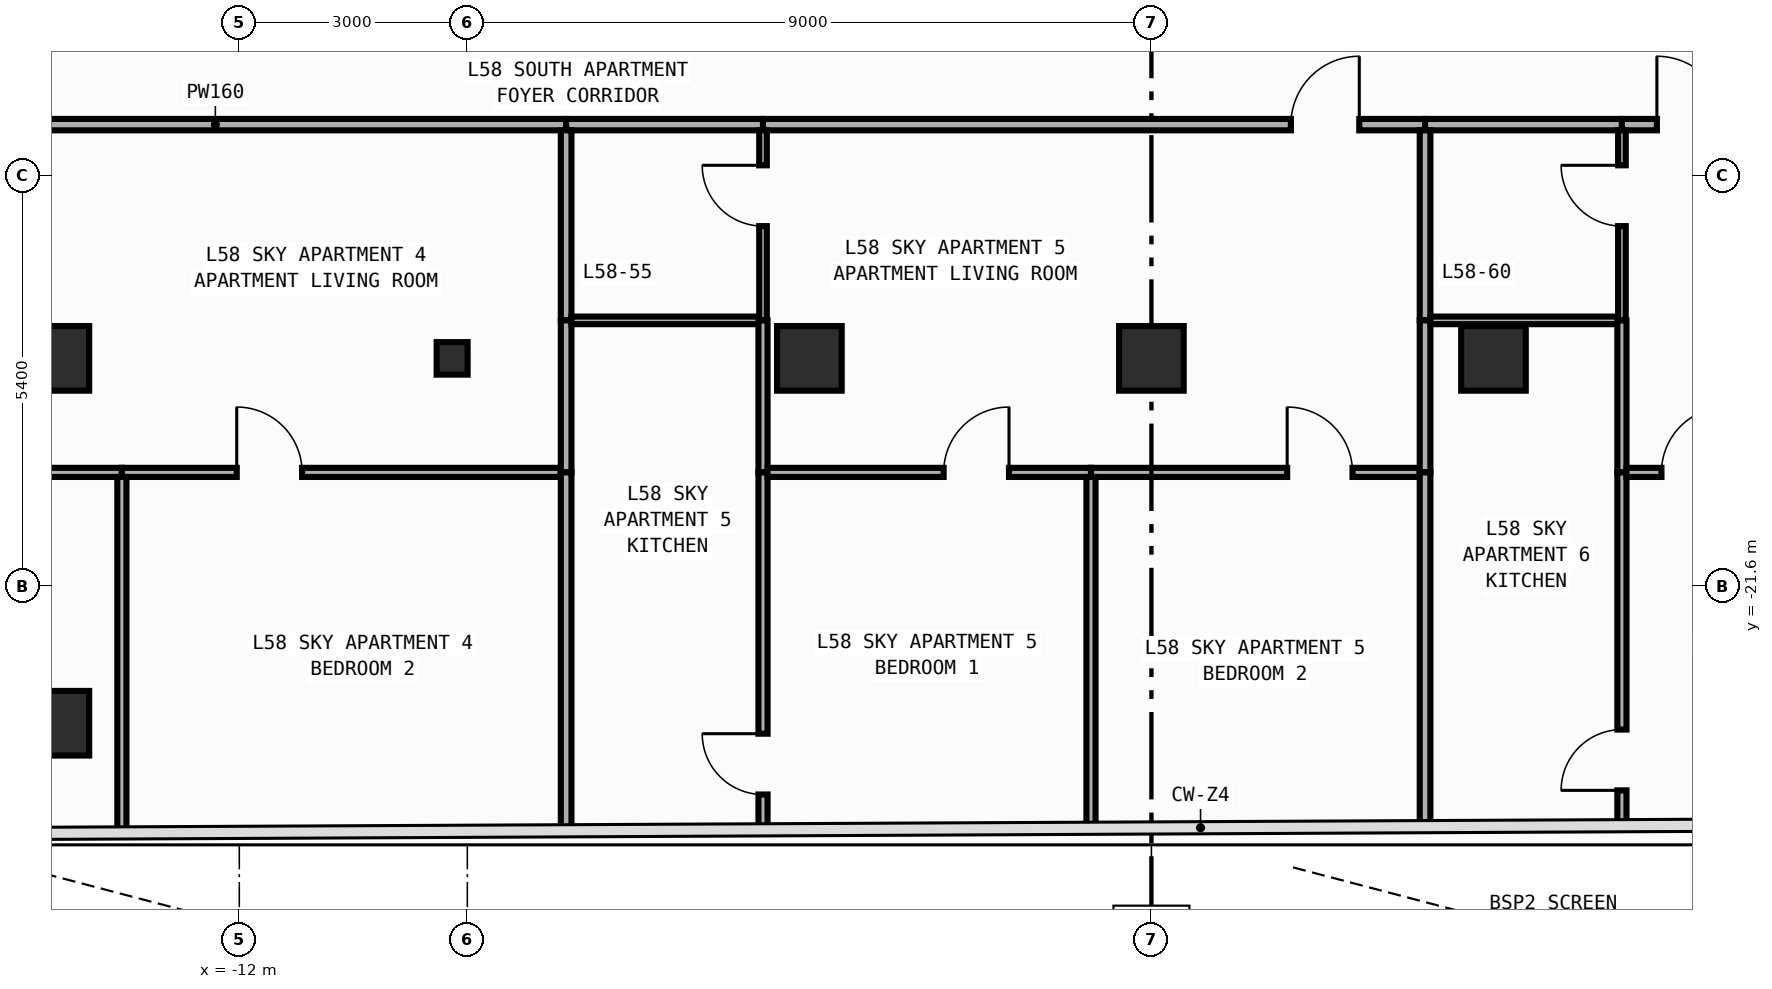
"""IFC4 building model, lengths in metres.
Left out: names, types, materials, properties, quantities, classifications, styles, units other than length and angle.
Written with IfcOpenShell. Run it as: python <this file> out.ifc"""

import sys

from ifc_helpers import new_model, si_unit, direction, frame, frame_2d, origin, origin_2d, place, context, subcontext, project, spatial, rectangle, i_section, extrude, element, fill, save


model = new_model("IFC4")
c1 = context("Model", 3, precision=1e-05, world=origin(), true_north=direction((0.0, 1.0)))
c2 = subcontext(c1, "Body", "Model", "MODEL_VIEW")
j1 = project(units=[si_unit("LENGTHUNIT", "METRE"), si_unit("PLANEANGLEUNIT", "RADIAN")], contexts=[c1])
p1 = place(None, origin())
s1 = spatial("IfcSite", under=j1, at=p1, CompositionType="ELEMENT")
p2 = place(p1, origin())
s2 = spatial("IfcBuilding", under=s1, at=p2, CompositionType="ELEMENT")
p3 = place(p2, frame((0.0, 0.0, 247.6)))
s3 = spatial("IfcBuildingStorey", under=s2, at=p3, CompositionType="ELEMENT", Elevation=247.6)
p4 = place(p3, frame((-9.2, -18.6, 0.0), z_axis=(0.0, 0.0, 1.0), x_axis=(1.0, 0.0, 0.0)))
e1 = element("IfcColumn", 1, at=p4, inside=s3, PredefinedType="COLUMN", context=c2, shape_type="SweptSolid", body=[
    extrude(i_section(OverallWidth=0.407, OverallDepth=0.428, WebThickness=0.02, FlangeThickness=0.035, FilletRadius=0.022, at=origin_2d()), origin(), (0.0, 0.0, 1.0), 3.6),
])
for number, where, z_axis, x_axis in (
    (2, (-14.4, -18.6, 0.0), (0.0, 0.0, 1.0), (1.0, 0.0, 0.0)),
    (3, (-4.5, -18.6, 0.0), (0.0, 0.0, 1.0), (1.0, 0.0, 0.0)),
    (4, (0.0, -18.6, 0.0), (0.0, 0.0, 1.0), (1.0, 0.0, 0.0)),
    (5, (4.5, -18.6, 0.0), (0.0, 0.0, 1.0), (1.0, 0.0, 0.0)),
    (6, (-14.4, -23.4, 0.0), (0.0, 0.0, 1.0), (1.0, 0.0, 0.0)),
):
    element("IfcColumn", number, at=place(p3, frame(where, z_axis=z_axis, x_axis=x_axis)), inside=s3, PredefinedType="COLUMN", context=c2, shape_type="SweptSolid", body=[
        extrude(rectangle(XDim=0.85, YDim=0.85, at=origin_2d()), origin(), (0.0, 0.0, 1.0), 3.6),
    ])
p5 = place(p3, frame((-19.31, -15.525, 0.0), z_axis=(0.0, 0.0, 1.0), x_axis=(1.0, 0.0, 0.0)))
e7 = element("IfcWall", 7, at=p5, inside=s3, PredefinedType="PARTITIONING", context=c2, shape_type="SweptSolid", body=[
    extrude(rectangle(XDim=11.61, YDim=0.15, at=frame_2d((5.805, 0.0))), origin(), (0.0, 0.0, 1.0), 3.34),
])
p6 = place(p5, frame((1.48, 0.0, 0.0)))
e8 = element("IfcOpeningElement", 8, at=p6, cuts=e7, PredefinedType="OPENING", context=c2, shape_type="SweptSolid", body=[
    extrude(rectangle(XDim=0.9, YDim=2.15, at=frame_2d((0.45, 1.075))), frame((0.0, 0.085, 0.0), z_axis=(0.0, -1.0, 0.0), x_axis=(1.0, 0.0, 0.0)), (0.0, 0.0, 1.0), 0.17),
])
p7 = place(p3, frame((-7.7, -15.525, 0.0), z_axis=(0.0, 0.0, 1.0), x_axis=(1.0, 0.0, 0.0)))
e9 = element("IfcWall", 9, at=p7, inside=s3, PredefinedType="PARTITIONING", context=c2, shape_type="SweptSolid", body=[
    extrude(rectangle(XDim=2.59, YDim=0.15, at=frame_2d((1.295, 0.0))), origin(), (0.0, 0.0, 1.0), 3.34),
])
p8 = place(p3, frame((-5.11, -15.525, 0.0), z_axis=(0.0, 0.0, 1.0), x_axis=(1.0, 0.0, 0.0)))
e10 = element("IfcWall", 10, at=p8, inside=s3, PredefinedType="PARTITIONING", context=c2, shape_type="SweptSolid", body=[
    extrude(rectangle(XDim=8.71, YDim=0.15, at=frame_2d((4.355, 0.0))), origin(), (0.0, 0.0, 1.0), 3.34),
])
p9 = place(p8, frame((6.945, 0.0, 0.0)))
e11 = element("IfcOpeningElement", 11, at=p9, cuts=e10, PredefinedType="OPENING", context=c2, shape_type="SweptSolid", body=[
    extrude(rectangle(XDim=0.9, YDim=2.15, at=frame_2d((0.45, 1.075))), frame((0.0, 0.085, 0.0), z_axis=(0.0, -1.0, 0.0), x_axis=(1.0, 0.0, 0.0)), (0.0, 0.0, 1.0), 0.17),
])
p10 = place(p3, frame((3.6, -15.525, 0.0), z_axis=(0.0, 0.0, 1.0), x_axis=(1.0, 0.0, 0.0)))
e12 = element("IfcWall", 12, at=p10, inside=s3, PredefinedType="PARTITIONING", context=c2, shape_type="SweptSolid", body=[
    extrude(rectangle(XDim=2.59, YDim=0.15, at=frame_2d((1.295, 0.0))), origin(), (0.0, 0.0, 1.0), 3.34),
])
p11 = place(p3, frame((6.19, -15.525, 0.0), z_axis=(0.0, 0.0, 1.0), x_axis=(1.0, 0.0, 0.0)))
e13 = element("IfcWall", 13, at=p11, inside=s3, PredefinedType="PARTITIONING", context=c2, shape_type="SweptSolid", body=[
    extrude(rectangle(XDim=6.05, YDim=0.15, at=frame_2d((3.025, 0.0))), origin(), (0.0, 0.0, 1.0), 3.34),
])
p12 = place(p11, frame((0.46, 0.0, 0.0)))
e14 = element("IfcOpeningElement", 14, at=p12, cuts=e13, PredefinedType="OPENING", context=c2, shape_type="SweptSolid", body=[
    extrude(rectangle(XDim=0.9, YDim=2.15, at=frame_2d((0.45, 1.075))), frame((0.0, 0.085, 0.0), z_axis=(0.0, -1.0, 0.0), x_axis=(1.0, 0.0, 0.0)), (0.0, 0.0, 1.0), 0.17),
])
p13 = place(p3, frame((-19.25, -20.1, 0.0), z_axis=(0.0, 0.0, 1.0), x_axis=(1.0, 0.0, 0.0)))
e15 = element("IfcWall", 15, at=p13, inside=s3, PredefinedType="PARTITIONING", context=c2, shape_type="SweptSolid", body=[
    extrude(rectangle(XDim=5.705, YDim=0.12, at=frame_2d((2.853, 0.0))), origin(), (0.0, 0.0, 1.0), 3.34),
])
p14 = place(p13, frame((1.493, 0.0, 0.0)))
e16 = element("IfcOpeningElement", 16, at=p14, cuts=e15, PredefinedType="OPENING", context=c2, shape_type="SweptSolid", body=[
    extrude(rectangle(XDim=0.86, YDim=2.15, at=frame_2d((0.43, 1.075))), frame((0.0, 0.07, 0.0), z_axis=(0.0, -1.0, 0.0), x_axis=(1.0, 0.0, 0.0)), (0.0, 0.0, 1.0), 0.14),
])
p15 = place(p3, frame((-13.545, -20.1, 0.0), z_axis=(0.0, 0.0, 1.0), x_axis=(1.0, 0.0, 0.0)))
e17 = element("IfcWall", 17, at=p15, inside=s3, PredefinedType="PARTITIONING", context=c2, shape_type="SweptSolid", body=[
    extrude(rectangle(XDim=5.775, YDim=0.12, at=frame_2d((2.887, 0.0))), origin(), (0.0, 0.0, 1.0), 3.34),
])
p16 = place(p15, frame((1.511, 0.0, 0.0)))
e18 = element("IfcOpeningElement", 18, at=p16, cuts=e17, PredefinedType="OPENING", context=c2, shape_type="SweptSolid", body=[
    extrude(rectangle(XDim=0.86, YDim=2.15, at=frame_2d((0.43, 1.075))), frame((0.0, 0.07, 0.0), z_axis=(0.0, -1.0, 0.0), x_axis=(1.0, 0.0, 0.0)), (0.0, 0.0, 1.0), 0.14),
])
p17 = place(p3, frame((-7.7, -18.1, 0.0), z_axis=(0.0, 0.0, 1.0), x_axis=(0.0, 1.0, 0.0)))
e19 = element("IfcWall", 19, at=p17, inside=s3, PredefinedType="PARTITIONING", context=c2, shape_type="SweptSolid", body=[
    extrude(rectangle(XDim=2.5, YDim=0.14, at=frame_2d((1.25, 0.0))), origin(), (0.0, 0.0, 1.0), 3.34),
])
p18 = place(p3, frame((-7.7, -20.1, 0.0), z_axis=(0.0, 0.0, 1.0), x_axis=(0.0, 1.0, 0.0)))
e20 = element("IfcWall", 20, at=p18, inside=s3, PredefinedType="PARTITIONING", context=c2, shape_type="SweptSolid", body=[
    extrude(rectangle(XDim=2.0, YDim=0.14, at=frame_2d((1.0, 0.0))), origin(), (0.0, 0.0, 1.0), 3.34),
])
p19 = place(p3, frame((-13.545, -24.838, 0.0), z_axis=(0.0, 0.0, 1.0), x_axis=(0.0, 1.0, 0.0)))
e21 = element("IfcWall", 21, at=p19, inside=s3, PredefinedType="PARTITIONING", context=c2, shape_type="SweptSolid", body=[
    extrude(rectangle(XDim=4.678, YDim=0.12, at=frame_2d((2.339, 0.0))), origin(), (0.0, 0.0, 1.0), 3.34),
])
p20 = place(p3, frame((-7.7, -24.81, 0.0), z_axis=(0.0, 0.0, 1.0), x_axis=(0.0, 1.0, 0.0)))
e22 = element("IfcWall", 22, at=p20, inside=s3, PredefinedType="PARTITIONING", context=c2, shape_type="SweptSolid", body=[
    extrude(rectangle(XDim=4.71, YDim=0.14, at=frame_2d((2.355, 0.0))), origin(), (0.0, 0.0, 1.0), 3.34),
])
p21 = place(p3, frame((-7.63, -18.1, 0.0), z_axis=(0.0, 0.0, 1.0), x_axis=(1.0, 0.0, 0.0)))
e23 = element("IfcWall", 23, at=p21, inside=s3, PredefinedType="PARTITIONING", context=c2, shape_type="SweptSolid", body=[
    extrude(rectangle(XDim=2.47, YDim=0.1, at=frame_2d((1.235, 0.0))), origin(), (0.0, 0.0, 1.0), 3.34),
])
p22 = place(p3, frame((-5.11, -18.1, 0.0), z_axis=(0.0, 0.0, 1.0), x_axis=(0.0, 1.0, 0.0)))
e24 = element("IfcWall", 24, at=p22, inside=s3, PredefinedType="PARTITIONING", context=c2, shape_type="SweptSolid", body=[
    extrude(rectangle(XDim=2.5, YDim=0.1, at=frame_2d((1.25, 0.0))), origin(), (0.0, 0.0, 1.0), 3.34),
])
p23 = place(p22, frame((1.24, 0.0, 0.0)))
e25 = element("IfcOpeningElement", 25, at=p23, cuts=e24, PredefinedType="OPENING", context=c2, shape_type="SweptSolid", body=[
    extrude(rectangle(XDim=0.8, YDim=2.1, at=frame_2d((0.4, 1.05))), frame((0.0, 0.06, 0.0), z_axis=(0.0, -1.0, 0.0), x_axis=(1.0, 0.0, 0.0)), (0.0, 0.0, 1.0), 0.12),
])
p24 = place(p3, frame((-5.11, -20.1, 0.0), z_axis=(0.0, 0.0, 1.0), x_axis=(0.0, 1.0, 0.0)))
e26 = element("IfcWall", 26, at=p24, inside=s3, PredefinedType="PARTITIONING", context=c2, shape_type="SweptSolid", body=[
    extrude(rectangle(XDim=2.0, YDim=0.12, at=frame_2d((1.0, 0.0))), origin(), (0.0, 0.0, 1.0), 3.34),
])
p25 = place(p3, frame((-5.11, -24.798, 0.0), z_axis=(0.0, 0.0, 1.0), x_axis=(0.0, 1.0, 0.0)))
e27 = element("IfcWall", 27, at=p25, inside=s3, PredefinedType="PARTITIONING", context=c2, shape_type="SweptSolid", body=[
    extrude(rectangle(XDim=4.698, YDim=0.12, at=frame_2d((2.349, 0.0))), origin(), (0.0, 0.0, 1.0), 3.34),
])
p26 = place(p25, frame((0.46, 0.0, 0.0)))
e28 = element("IfcOpeningElement", 28, at=p26, cuts=e27, PredefinedType="OPENING", context=c2, shape_type="SweptSolid", body=[
    extrude(rectangle(XDim=0.8, YDim=2.1, at=frame_2d((0.4, 1.05))), frame((0.0, 0.07, 0.0), z_axis=(0.0, -1.0, 0.0), x_axis=(1.0, 0.0, 0.0)), (0.0, 0.0, 1.0), 0.14),
])
p27 = place(p3, frame((-5.05, -20.1, 0.0), z_axis=(0.0, 0.0, 1.0), x_axis=(1.0, 0.0, 0.0)))
e29 = element("IfcWall", 29, at=p27, inside=s3, PredefinedType="PARTITIONING", context=c2, shape_type="SweptSolid", body=[
    extrude(rectangle(XDim=4.255, YDim=0.12, at=frame_2d((2.127, 0.0))), origin(), (0.0, 0.0, 1.0), 3.34),
])
p28 = place(p27, frame((2.316, 0.0, 0.0)))
e30 = element("IfcOpeningElement", 30, at=p28, cuts=e29, PredefinedType="OPENING", context=c2, shape_type="SweptSolid", body=[
    extrude(rectangle(XDim=0.86, YDim=2.15, at=frame_2d((0.43, 1.075))), frame((0.0, 0.07, 0.0), z_axis=(0.0, -1.0, 0.0), x_axis=(1.0, 0.0, 0.0)), (0.0, 0.0, 1.0), 0.14),
])
p29 = place(p3, frame((-0.795, -20.1, 0.0), z_axis=(0.0, 0.0, 1.0), x_axis=(1.0, 0.0, 0.0)))
e31 = element("IfcWall", 31, at=p29, inside=s3, PredefinedType="PARTITIONING", context=c2, shape_type="SweptSolid", body=[
    extrude(rectangle(XDim=4.325, YDim=0.12, at=frame_2d((2.163, 0.0))), origin(), (0.0, 0.0, 1.0), 3.34),
])
p30 = place(p29, frame((2.581, 0.0, 0.0)))
e32 = element("IfcOpeningElement", 32, at=p30, cuts=e31, PredefinedType="OPENING", context=c2, shape_type="SweptSolid", body=[
    extrude(rectangle(XDim=0.86, YDim=2.15, at=frame_2d((0.43, 1.075))), frame((0.0, 0.07, 0.0), z_axis=(0.0, -1.0, 0.0), x_axis=(1.0, 0.0, 0.0)), (0.0, 0.0, 1.0), 0.14),
])
p31 = place(p3, frame((3.6, -18.1, 0.0), z_axis=(0.0, 0.0, 1.0), x_axis=(0.0, 1.0, 0.0)))
e33 = element("IfcWall", 33, at=p31, inside=s3, PredefinedType="PARTITIONING", context=c2, shape_type="SweptSolid", body=[
    extrude(rectangle(XDim=2.5, YDim=0.14, at=frame_2d((1.25, 0.0))), origin(), (0.0, 0.0, 1.0), 3.34),
])
p32 = place(p3, frame((3.6, -20.1, 0.0), z_axis=(0.0, 0.0, 1.0), x_axis=(0.0, 1.0, 0.0)))
e34 = element("IfcWall", 34, at=p32, inside=s3, PredefinedType="PARTITIONING", context=c2, shape_type="SweptSolid", body=[
    extrude(rectangle(XDim=2.0, YDim=0.14, at=frame_2d((1.0, 0.0))), origin(), (0.0, 0.0, 1.0), 3.34),
])
p33 = place(p3, frame((-0.795, -24.777, 0.0), z_axis=(0.0, 0.0, 1.0), x_axis=(0.0, 1.0, 0.0)))
e35 = element("IfcWall", 35, at=p33, inside=s3, PredefinedType="PARTITIONING", context=c2, shape_type="SweptSolid", body=[
    extrude(rectangle(XDim=4.617, YDim=0.12, at=frame_2d((2.309, 0.0))), origin(), (0.0, 0.0, 1.0), 3.34),
])
p34 = place(p3, frame((3.6, -24.756, 0.0), z_axis=(0.0, 0.0, 1.0), x_axis=(0.0, 1.0, 0.0)))
e36 = element("IfcWall", 36, at=p34, inside=s3, PredefinedType="PARTITIONING", context=c2, shape_type="SweptSolid", body=[
    extrude(rectangle(XDim=4.656, YDim=0.14, at=frame_2d((2.328, 0.0))), origin(), (0.0, 0.0, 1.0), 3.34),
])
p35 = place(p3, frame((3.67, -18.1, 0.0), z_axis=(0.0, 0.0, 1.0), x_axis=(1.0, 0.0, 0.0)))
e37 = element("IfcWall", 37, at=p35, inside=s3, PredefinedType="PARTITIONING", context=c2, shape_type="SweptSolid", body=[
    extrude(rectangle(XDim=2.47, YDim=0.1, at=frame_2d((1.235, 0.0))), origin(), (0.0, 0.0, 1.0), 3.34),
])
p36 = place(p3, frame((6.19, -18.1, 0.0), z_axis=(0.0, 0.0, 1.0), x_axis=(0.0, 1.0, 0.0)))
e38 = element("IfcWall", 38, at=p36, inside=s3, PredefinedType="PARTITIONING", context=c2, shape_type="SweptSolid", body=[
    extrude(rectangle(XDim=2.5, YDim=0.1, at=frame_2d((1.25, 0.0))), origin(), (0.0, 0.0, 1.0), 3.34),
])
p37 = place(p36, frame((1.24, 0.0, 0.0)))
e39 = element("IfcOpeningElement", 39, at=p37, cuts=e38, PredefinedType="OPENING", context=c2, shape_type="SweptSolid", body=[
    extrude(rectangle(XDim=0.8, YDim=2.1, at=frame_2d((0.4, 1.05))), frame((0.0, 0.06, 0.0), z_axis=(0.0, -1.0, 0.0), x_axis=(1.0, 0.0, 0.0)), (0.0, 0.0, 1.0), 0.12),
])
p38 = place(p3, frame((6.19, -20.1, 0.0), z_axis=(0.0, 0.0, 1.0), x_axis=(0.0, 1.0, 0.0)))
e40 = element("IfcWall", 40, at=p38, inside=s3, PredefinedType="PARTITIONING", context=c2, shape_type="SweptSolid", body=[
    extrude(rectangle(XDim=2.0, YDim=0.12, at=frame_2d((1.0, 0.0))), origin(), (0.0, 0.0, 1.0), 3.34),
])
p39 = place(p3, frame((6.19, -24.743, 0.0), z_axis=(0.0, 0.0, 1.0), x_axis=(0.0, 1.0, 0.0)))
e41 = element("IfcWall", 41, at=p39, inside=s3, PredefinedType="PARTITIONING", context=c2, shape_type="SweptSolid", body=[
    extrude(rectangle(XDim=4.643, YDim=0.12, at=frame_2d((2.322, 0.0))), origin(), (0.0, 0.0, 1.0), 3.34),
])
p40 = place(p39, frame((0.46, 0.0, 0.0)))
e42 = element("IfcOpeningElement", 42, at=p40, cuts=e41, PredefinedType="OPENING", context=c2, shape_type="SweptSolid", body=[
    extrude(rectangle(XDim=0.8, YDim=2.1, at=frame_2d((0.4, 1.05))), frame((0.0, 0.07, 0.0), z_axis=(0.0, -1.0, 0.0), x_axis=(1.0, 0.0, 0.0)), (0.0, 0.0, 1.0), 0.14),
])
p41 = place(p3, frame((6.25, -20.1, 0.0), z_axis=(0.0, 0.0, 1.0), x_axis=(1.0, 0.0, 0.0)))
e43 = element("IfcWall", 43, at=p41, inside=s3, PredefinedType="PARTITIONING", context=c2, shape_type="SweptSolid", body=[
    extrude(rectangle(XDim=5.275, YDim=0.12, at=frame_2d((2.637, 0.0))), origin(), (0.0, 0.0, 1.0), 3.34),
])
p42 = place(p41, frame((0.46, 0.0, 0.0)))
e44 = element("IfcOpeningElement", 44, at=p42, cuts=e43, PredefinedType="OPENING", context=c2, shape_type="SweptSolid", body=[
    extrude(rectangle(XDim=0.86, YDim=2.15, at=frame_2d((0.43, 1.075))), frame((0.0, 0.07, 0.0), z_axis=(0.0, -1.0, 0.0), x_axis=(1.0, 0.0, 0.0)), (0.0, 0.0, 1.0), 0.14),
])
p43 = place(p9, origin())
e45 = element("IfcDoor", 45, at=p43, inside=s3, OperationType="SINGLE_SWING_RIGHT", PredefinedType="DOOR", context=c2, shape_type="SweptSolid", body=[
    extrude(rectangle(XDim=0.9, YDim=2.15, at=frame_2d((0.45, 1.075))), frame((0.0, 0.025, 0.0), z_axis=(0.0, -1.0, 0.0), x_axis=(1.0, 0.0, 0.0)), (0.0, 0.0, 1.0), 0.05),
])
fill(e11, e45)
p44 = place(p12, origin())
e46 = element("IfcDoor", 46, at=p44, inside=s3, OperationType="SINGLE_SWING_LEFT", PredefinedType="DOOR", context=c2, shape_type="SweptSolid", body=[
    extrude(rectangle(XDim=0.9, YDim=2.15, at=frame_2d((0.45, 1.075))), frame((0.0, 0.025, 0.0), z_axis=(0.0, -1.0, 0.0), x_axis=(1.0, 0.0, 0.0)), (0.0, 0.0, 1.0), 0.05),
])
fill(e14, e46)
p45 = place(p16, origin())
e47 = element("IfcDoor", 47, at=p45, inside=s3, OperationType="SINGLE_SWING_LEFT", PredefinedType="DOOR", context=c2, shape_type="SweptSolid", body=[
    extrude(rectangle(XDim=0.86, YDim=2.15, at=frame_2d((0.43, 1.075))), frame((0.0, 0.025, 0.0), z_axis=(0.0, -1.0, 0.0), x_axis=(1.0, 0.0, 0.0)), (0.0, 0.0, 1.0), 0.05),
])
fill(e18, e47)
p46 = place(p23, origin())
e48 = element("IfcDoor", 48, at=p46, inside=s3, OperationType="SINGLE_SWING_RIGHT", PredefinedType="DOOR", context=c2, shape_type="SweptSolid", body=[
    extrude(rectangle(XDim=0.8, YDim=2.1, at=frame_2d((0.4, 1.05))), frame((0.0, 0.025, 0.0), z_axis=(0.0, -1.0, 0.0), x_axis=(1.0, 0.0, 0.0)), (0.0, 0.0, 1.0), 0.05),
])
fill(e25, e48)
p47 = place(p28, origin())
e49 = element("IfcDoor", 49, at=p47, inside=s3, OperationType="SINGLE_SWING_RIGHT", PredefinedType="DOOR", context=c2, shape_type="SweptSolid", body=[
    extrude(rectangle(XDim=0.86, YDim=2.15, at=frame_2d((0.43, 1.075))), frame((0.0, 0.025, 0.0), z_axis=(0.0, -1.0, 0.0), x_axis=(1.0, 0.0, 0.0)), (0.0, 0.0, 1.0), 0.05),
])
fill(e30, e49)
p48 = place(p30, origin())
e50 = element("IfcDoor", 50, at=p48, inside=s3, OperationType="SINGLE_SWING_LEFT", PredefinedType="DOOR", context=c2, shape_type="SweptSolid", body=[
    extrude(rectangle(XDim=0.86, YDim=2.15, at=frame_2d((0.43, 1.075))), frame((0.0, 0.025, 0.0), z_axis=(0.0, -1.0, 0.0), x_axis=(1.0, 0.0, 0.0)), (0.0, 0.0, 1.0), 0.05),
])
fill(e32, e50)
p49 = place(p37, origin())
e51 = element("IfcDoor", 51, at=p49, inside=s3, OperationType="SINGLE_SWING_RIGHT", PredefinedType="DOOR", context=c2, shape_type="SweptSolid", body=[
    extrude(rectangle(XDim=0.8, YDim=2.1, at=frame_2d((0.4, 1.05))), frame((0.0, 0.025, 0.0), z_axis=(0.0, -1.0, 0.0), x_axis=(1.0, 0.0, 0.0)), (0.0, 0.0, 1.0), 0.05),
])
fill(e39, e51)
p50 = place(p42, origin())
e52 = element("IfcDoor", 52, at=p50, inside=s3, OperationType="SINGLE_SWING_RIGHT", PredefinedType="DOOR", context=c2, shape_type="SweptSolid", body=[
    extrude(rectangle(XDim=0.86, YDim=2.15, at=frame_2d((0.43, 1.075))), frame((0.0, 0.025, 0.0), z_axis=(0.0, -1.0, 0.0), x_axis=(1.0, 0.0, 0.0)), (0.0, 0.0, 1.0), 0.05),
])
fill(e44, e52)
p51 = place(p26, origin())
e53 = element("IfcDoor", 53, at=p51, inside=s3, OperationType="SINGLE_SWING_RIGHT", PredefinedType="DOOR", context=c2, shape_type="SweptSolid", body=[
    extrude(rectangle(XDim=0.8, YDim=2.1, at=frame_2d((0.4, 1.05))), frame((0.0, 0.025, 0.0), z_axis=(0.0, -1.0, 0.0), x_axis=(1.0, 0.0, 0.0)), (0.0, 0.0, 1.0), 0.05),
])
fill(e28, e53)
p52 = place(p40, origin())
e54 = element("IfcDoor", 54, at=p52, inside=s3, OperationType="SINGLE_SWING_LEFT", PredefinedType="DOOR", context=c2, shape_type="SweptSolid", body=[
    extrude(rectangle(XDim=0.8, YDim=2.1, at=frame_2d((0.4, 1.05))), frame((0.0, 0.025, 0.0), z_axis=(0.0, -1.0, 0.0), x_axis=(1.0, 0.0, 0.0)), (0.0, 0.0, 1.0), 0.05),
])
fill(e42, e54)
save(model, sys.argv[1])
